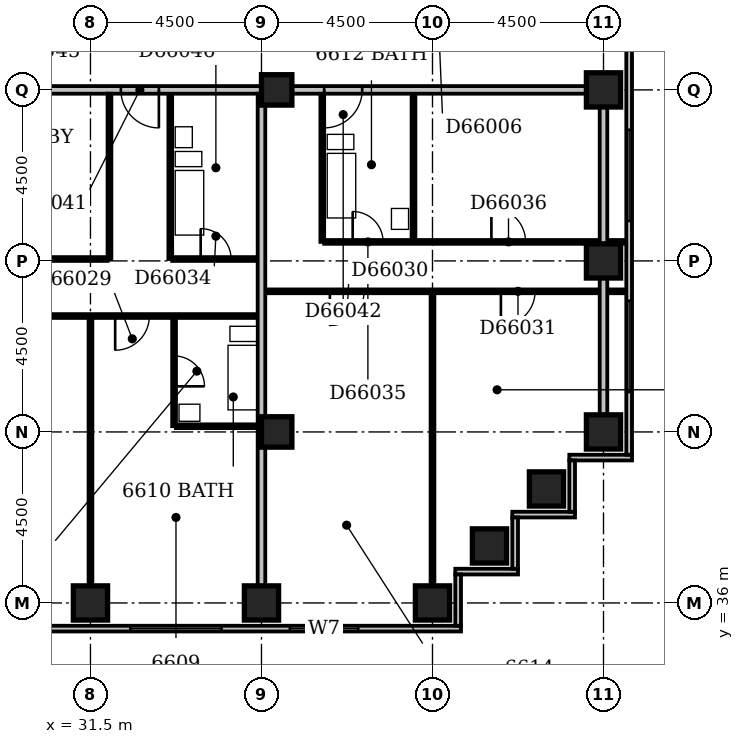
"""IFC4 building model, lengths in metres.
Left out: names, types, materials, properties, quantities, classifications, styles, units other than length and angle.
Written with IfcOpenShell. Run it as: python <this file> out.ifc"""

import sys

from ifc_helpers import new_model, si_unit, direction, frame, frame_2d, origin, origin_2d, place, context, subcontext, project, spatial, rectangle, extrude, element, fill, save


model = new_model("IFC4")
c1 = context("Model", 3, precision=1e-05, world=origin(), true_north=direction((0.0, 1.0)))
c2 = subcontext(c1, "Body", "Model", "MODEL_VIEW")
j1 = project(units=[si_unit("LENGTHUNIT", "METRE"), si_unit("PLANEANGLEUNIT", "RADIAN")], contexts=[c1])
p1 = place(None, origin())
s1 = spatial("IfcSite", under=j1, at=p1, CompositionType="ELEMENT")
p2 = place(p1, origin())
s2 = spatial("IfcBuilding", under=s1, at=p2, CompositionType="ELEMENT")
p3 = place(p2, frame((0.0, 0.0, 254.6)))
s3 = spatial("IfcBuildingStorey", under=s2, at=p3, CompositionType="ELEMENT", Elevation=254.6)
for number, where, z_axis, x_axis in (
    (1, (31.5, 36.0, -0.3), (0.0, 0.0, 1.0), (1.0, 0.0, 0.0)),
    (2, (36.0, 36.0, -0.3), (0.0, 0.0, 1.0), (1.0, 0.0, 0.0)),
    (3, (40.5, 36.0, -0.3), (0.0, 0.0, 1.0), (1.0, 0.0, 0.0)),
    (4, (42.0, 37.5, -0.3), (0.0, 0.0, 1.0), (1.0, 0.0, 0.0)),
    (5, (43.5, 39.0, -0.3), (0.0, 0.0, 1.0), (1.0, 0.0, 0.0)),
    (6, (45.0, 40.5, -0.3), (0.0, 0.0, 1.0), (1.0, 0.0, 0.0)),
    (7, (45.0, 45.0, -0.3), (0.0, 0.0, 1.0), (1.0, 0.0, 0.0)),
    (8, (45.0, 49.5, -0.3), (0.0, 0.0, 1.0), (1.0, 0.0, 0.0)),
):
    element("IfcColumn", number, at=place(p3, frame(where, z_axis=z_axis, x_axis=x_axis)), inside=s3, PredefinedType="COLUMN", context=c2, shape_type="SweptSolid", body=[
        extrude(rectangle(XDim=0.9, YDim=0.9, at=origin_2d()), origin(), (0.0, 0.0, 1.0), 3.45),
    ])
for number, where, z_axis, x_axis in (
    (9, (36.4, 40.5, -0.3), (0.0, 0.0, 1.0), (1.0, 0.0, 0.0)),
    (10, (36.4, 49.5, -0.3), (0.0, 0.0, 1.0), (1.0, 0.0, 0.0)),
):
    element("IfcColumn", number, at=place(p3, frame(where, z_axis=z_axis, x_axis=x_axis)), inside=s3, PredefinedType="COLUMN", context=c2, shape_type="SweptSolid", body=[
        extrude(rectangle(XDim=0.8, YDim=0.8, at=origin_2d()), origin(), (0.0, 0.0, 1.0), 3.45),
    ])
p4 = place(p3, frame((23.1, 35.325, 0.0), z_axis=(0.0, 0.0, 1.0), x_axis=(1.0, 0.0, 0.0)))
e11 = element("IfcWall", 11, at=p4, inside=s3, PredefinedType="STANDARD", context=c2, shape_type="SweptSolid", body=[
    extrude(rectangle(XDim=18.15, YDim=0.15, at=frame_2d((9.075, 0.0))), origin(), (0.0, 0.0, 1.0), 2.7),
])
p5 = place(p4, frame((0.45, 0.0, 0.6)))
e12 = element("IfcOpeningElement", 12, at=p5, cuts=e11, PredefinedType="OPENING", context=c2, shape_type="SweptSolid", body=[
    extrude(rectangle(XDim=2.4, YDim=1.8, at=frame_2d((1.2, 0.9))), frame((0.0, 0.087, 0.0), z_axis=(0.0, -1.0, 0.0), x_axis=(1.0, 0.0, 0.0)), (0.0, 0.0, 1.0), 0.174),
])
p6 = place(p4, frame((4.95, 0.0, 0.6)))
e13 = element("IfcOpeningElement", 13, at=p6, cuts=e11, PredefinedType="OPENING", context=c2, shape_type="SweptSolid", body=[
    extrude(rectangle(XDim=2.4, YDim=1.8, at=frame_2d((1.2, 0.9))), frame((0.0, 0.087, 0.0), z_axis=(0.0, -1.0, 0.0), x_axis=(1.0, 0.0, 0.0)), (0.0, 0.0, 1.0), 0.174),
])
p7 = place(p4, frame((9.45, 0.0, 0.6)))
e14 = element("IfcOpeningElement", 14, at=p7, cuts=e11, PredefinedType="OPENING", context=c2, shape_type="SweptSolid", body=[
    extrude(rectangle(XDim=2.4, YDim=1.8, at=frame_2d((1.2, 0.9))), frame((0.0, 0.087, 0.0), z_axis=(0.0, -1.0, 0.0), x_axis=(1.0, 0.0, 0.0)), (0.0, 0.0, 1.0), 0.174),
])
p8 = place(p4, frame((13.646, 0.0, 0.6)))
e15 = element("IfcOpeningElement", 15, at=p8, cuts=e11, PredefinedType="OPENING", context=c2, shape_type="SweptSolid", body=[
    extrude(rectangle(XDim=1.8, YDim=1.8, at=frame_2d((0.9, 0.9))), frame((0.0, 0.087, 0.0), z_axis=(0.0, -1.0, 0.0), x_axis=(1.0, 0.0, 0.0)), (0.0, 0.0, 1.0), 0.174),
])
p9 = place(p3, frame((41.175, 35.4, 0.0), z_axis=(0.0, 0.0, 1.0), x_axis=(0.0, 1.0, 0.0)))
e16 = element("IfcWall", 16, at=p9, inside=s3, PredefinedType="STANDARD", context=c2, shape_type="SweptSolid", body=[
    extrude(rectangle(XDim=1.35, YDim=0.15, at=frame_2d((0.675, 0.0))), origin(), (0.0, 0.0, 1.0), 2.7),
])
p10 = place(p3, frame((41.1, 36.825, 0.0), z_axis=(0.0, 0.0, 1.0), x_axis=(1.0, 0.0, 0.0)))
e17 = element("IfcWall", 17, at=p10, inside=s3, PredefinedType="STANDARD", context=c2, shape_type="SweptSolid", body=[
    extrude(rectangle(XDim=1.65, YDim=0.15, at=frame_2d((0.825, 0.0))), origin(), (0.0, 0.0, 1.0), 2.7),
])
p11 = place(p3, frame((42.675, 36.9, 0.0), z_axis=(0.0, 0.0, 1.0), x_axis=(0.0, 1.0, 0.0)))
e18 = element("IfcWall", 18, at=p11, inside=s3, PredefinedType="STANDARD", context=c2, shape_type="SweptSolid", body=[
    extrude(rectangle(XDim=1.35, YDim=0.15, at=frame_2d((0.675, 0.0))), origin(), (0.0, 0.0, 1.0), 2.7),
])
p12 = place(p3, frame((42.6, 38.325, 0.0), z_axis=(0.0, 0.0, 1.0), x_axis=(1.0, 0.0, 0.0)))
e19 = element("IfcWall", 19, at=p12, inside=s3, PredefinedType="STANDARD", context=c2, shape_type="SweptSolid", body=[
    extrude(rectangle(XDim=1.65, YDim=0.15, at=frame_2d((0.825, 0.0))), origin(), (0.0, 0.0, 1.0), 2.7),
])
p13 = place(p3, frame((44.175, 38.4, 0.0), z_axis=(0.0, 0.0, 1.0), x_axis=(0.0, 1.0, 0.0)))
e20 = element("IfcWall", 20, at=p13, inside=s3, PredefinedType="STANDARD", context=c2, shape_type="SweptSolid", body=[
    extrude(rectangle(XDim=1.35, YDim=0.15, at=frame_2d((0.675, 0.0))), origin(), (0.0, 0.0, 1.0), 2.7),
])
p14 = place(p3, frame((44.1, 39.825, 0.0), z_axis=(0.0, 0.0, 1.0), x_axis=(1.0, 0.0, 0.0)))
e21 = element("IfcWall", 21, at=p14, inside=s3, PredefinedType="STANDARD", context=c2, shape_type="SweptSolid", body=[
    extrude(rectangle(XDim=1.65, YDim=0.15, at=frame_2d((0.825, 0.0))), origin(), (0.0, 0.0, 1.0), 2.7),
])
p15 = place(p3, frame((45.675, 39.9, 0.0), z_axis=(0.0, 0.0, 1.0), x_axis=(0.0, 1.0, 0.0)))
e22 = element("IfcWall", 22, at=p15, inside=s3, PredefinedType="STANDARD", context=c2, shape_type="SweptSolid", body=[
    extrude(rectangle(XDim=19.35, YDim=0.15, at=frame_2d((9.675, 0.0))), origin(), (0.0, 0.0, 1.0), 2.7),
])
p16 = place(p15, frame((1.65, 0.0, 0.6)))
e23 = element("IfcOpeningElement", 23, at=p16, cuts=e22, PredefinedType="OPENING", context=c2, shape_type="SweptSolid", body=[
    extrude(rectangle(XDim=2.4, YDim=1.8, at=frame_2d((1.2, 0.9))), frame((0.0, 0.087, 0.0), z_axis=(0.0, -1.0, 0.0), x_axis=(1.0, 0.0, 0.0)), (0.0, 0.0, 1.0), 0.174),
])
p17 = place(p15, frame((6.15, 0.0, 0.6)))
e24 = element("IfcOpeningElement", 24, at=p17, cuts=e22, PredefinedType="OPENING", context=c2, shape_type="SweptSolid", body=[
    extrude(rectangle(XDim=2.4, YDim=1.8, at=frame_2d((1.2, 0.9))), frame((0.0, 0.087, 0.0), z_axis=(0.0, -1.0, 0.0), x_axis=(1.0, 0.0, 0.0)), (0.0, 0.0, 1.0), 0.174),
])
p18 = place(p3, frame((31.5, 36.45, 0.0), z_axis=(0.0, 0.0, 1.0), x_axis=(0.0, 1.0, 0.0)))
e25 = element("IfcWall", 25, at=p18, inside=s3, PredefinedType="PARTITIONING", context=c2, shape_type="SweptSolid", body=[
    extrude(rectangle(XDim=7.05, YDim=0.1, at=frame_2d((3.525, 0.0))), origin(), (0.0, 0.0, 1.0), 3.15),
])
p19 = place(p3, frame((36.0, 36.45, 0.0), z_axis=(0.0, 0.0, 1.0), x_axis=(0.0, 1.0, 0.0)))
e26 = element("IfcWall", 26, at=p19, inside=s3, PredefinedType="PARTITIONING", context=c2, shape_type="SweptSolid", body=[
    extrude(rectangle(XDim=12.95, YDim=0.2, at=frame_2d((6.475, 0.0))), origin(), (0.0, 0.0, 1.0), 3.15),
])
p20 = place(p3, frame((40.5, 36.45, 0.0), z_axis=(0.0, 0.0, 1.0), x_axis=(0.0, 1.0, 0.0)))
e27 = element("IfcWall", 27, at=p20, inside=s3, PredefinedType="PARTITIONING", context=c2, shape_type="SweptSolid", body=[
    extrude(rectangle(XDim=7.7, YDim=0.1, at=frame_2d((3.85, 0.0))), origin(), (0.0, 0.0, 1.0), 3.15),
])
p21 = place(p3, frame((33.7, 40.65, 0.0), z_axis=(0.0, 0.0, 1.0), x_axis=(0.0, 1.0, 0.0)))
e28 = element("IfcWall", 28, at=p21, inside=s3, PredefinedType="PLUMBINGWALL", context=c2, shape_type="SweptSolid", body=[
    extrude(rectangle(XDim=2.85, YDim=0.1, at=frame_2d((1.425, 0.0))), origin(), (0.0, 0.0, 1.0), 3.15),
])
p22 = place(p21, frame((1.05, 0.0, 0.0)))
e29 = element("IfcOpeningElement", 29, at=p22, cuts=e28, PredefinedType="OPENING", context=c2, shape_type="SweptSolid", body=[
    extrude(rectangle(XDim=0.8, YDim=2.1, at=frame_2d((0.4, 1.05))), frame((0.0, 0.062, 0.0), z_axis=(0.0, -1.0, 0.0), x_axis=(1.0, 0.0, 0.0)), (0.0, 0.0, 1.0), 0.124),
])
p23 = place(p3, frame((33.75, 40.65, 0.0), z_axis=(0.0, 0.0, 1.0), x_axis=(1.0, 0.0, 0.0)))
e30 = element("IfcWall", 30, at=p23, inside=s3, PredefinedType="PLUMBINGWALL", context=c2, shape_type="SweptSolid", body=[
    extrude(rectangle(XDim=2.15, YDim=0.1, at=frame_2d((1.075, 0.0))), origin(), (0.0, 0.0, 1.0), 3.15),
])
p24 = place(p3, frame((45.0, 40.95, 0.0), z_axis=(0.0, 0.0, 1.0), x_axis=(0.0, 1.0, 0.0)))
e31 = element("IfcWall", 31, at=p24, inside=s3, PredefinedType="PARTITIONING", context=c2, shape_type="SweptSolid", body=[
    extrude(rectangle(XDim=8.1, YDim=0.2, at=frame_2d((4.05, 0.0))), origin(), (0.0, 0.0, 1.0), 2.7),
])
p25 = place(p3, frame((27.1, 43.55, 0.0), z_axis=(0.0, 0.0, 1.0), x_axis=(1.0, 0.0, 0.0)))
e32 = element("IfcWall", 32, at=p25, inside=s3, PredefinedType="PARTITIONING", context=c2, shape_type="SweptSolid", body=[
    extrude(rectangle(XDim=8.8, YDim=0.1, at=frame_2d((4.4, 0.0))), origin(), (0.0, 0.0, 1.0), 3.15),
])
p26 = place(p25, frame((1.7, 0.0, 0.0)))
e33 = element("IfcOpeningElement", 33, at=p26, cuts=e32, PredefinedType="OPENING", context=c2, shape_type="SweptSolid", body=[
    extrude(rectangle(XDim=0.9, YDim=2.1, at=frame_2d((0.45, 1.05))), frame((0.0, 0.062, 0.0), z_axis=(0.0, -1.0, 0.0), x_axis=(1.0, 0.0, 0.0)), (0.0, 0.0, 1.0), 0.124),
])
p27 = place(p25, frame((5.05, 0.0, 0.0)))
e34 = element("IfcOpeningElement", 34, at=p27, cuts=e32, PredefinedType="OPENING", context=c2, shape_type="SweptSolid", body=[
    extrude(rectangle(XDim=0.9, YDim=2.1, at=frame_2d((0.45, 1.05))), frame((0.0, 0.062, 0.0), z_axis=(0.0, -1.0, 0.0), x_axis=(1.0, 0.0, 0.0)), (0.0, 0.0, 1.0), 0.124),
])
p28 = place(p3, frame((36.1, 44.2, 0.0), z_axis=(0.0, 0.0, 1.0), x_axis=(1.0, 0.0, 0.0)))
e35 = element("IfcWall", 35, at=p28, inside=s3, PredefinedType="PARTITIONING", context=c2, shape_type="SweptSolid", body=[
    extrude(rectangle(XDim=9.5, YDim=0.1, at=frame_2d((4.75, 0.0))), origin(), (0.0, 0.0, 1.0), 3.15),
])
p29 = place(p28, frame((1.7, 0.0, 0.0)))
e36 = element("IfcOpeningElement", 36, at=p29, cuts=e35, PredefinedType="OPENING", context=c2, shape_type="SweptSolid", body=[
    extrude(rectangle(XDim=0.9, YDim=2.1, at=frame_2d((0.45, 1.05))), frame((0.0, 0.062, 0.0), z_axis=(0.0, -1.0, 0.0), x_axis=(1.0, 0.0, 0.0)), (0.0, 0.0, 1.0), 0.124),
])
p30 = place(p28, frame((6.2, 0.0, 0.0)))
e37 = element("IfcOpeningElement", 37, at=p30, cuts=e35, PredefinedType="OPENING", context=c2, shape_type="SweptSolid", body=[
    extrude(rectangle(XDim=0.9, YDim=2.1, at=frame_2d((0.45, 1.05))), frame((0.0, 0.062, 0.0), z_axis=(0.0, -1.0, 0.0), x_axis=(1.0, 0.0, 0.0)), (0.0, 0.0, 1.0), 0.124),
])
p31 = place(p3, frame((27.1, 45.05, 0.0), z_axis=(0.0, 0.0, 1.0), x_axis=(1.0, 0.0, 0.0)))
e38 = element("IfcWall", 38, at=p31, inside=s3, PredefinedType="PARTITIONING", context=c2, shape_type="SweptSolid", body=[
    extrude(rectangle(XDim=4.85, YDim=0.1, at=frame_2d((2.425, 0.0))), origin(), (0.0, 0.0, 1.0), 3.15),
])
p32 = place(p31, frame((1.95, 0.0, 0.0)))
e39 = element("IfcOpeningElement", 39, at=p32, cuts=e38, PredefinedType="OPENING", context=c2, shape_type="SweptSolid", body=[
    extrude(rectangle(XDim=0.9, YDim=2.1, at=frame_2d((0.45, 1.05))), frame((0.0, 0.062, 0.0), z_axis=(0.0, -1.0, 0.0), x_axis=(1.0, 0.0, 0.0)), (0.0, 0.0, 1.0), 0.124),
])
p33 = place(p3, frame((32.0, 45.05, 0.0), z_axis=(0.0, 0.0, 1.0), x_axis=(0.0, 1.0, 0.0)))
e40 = element("IfcWall", 40, at=p33, inside=s3, PredefinedType="PARTITIONING", context=c2, shape_type="SweptSolid", body=[
    extrude(rectangle(XDim=4.35, YDim=0.1, at=frame_2d((2.175, 0.0))), origin(), (0.0, 0.0, 1.0), 3.15),
])
p34 = place(p3, frame((33.6, 45.05, 0.0), z_axis=(0.0, 0.0, 1.0), x_axis=(0.0, 1.0, 0.0)))
e41 = element("IfcWall", 41, at=p34, inside=s3, PredefinedType="PLUMBINGWALL", context=c2, shape_type="SweptSolid", body=[
    extrude(rectangle(XDim=4.35, YDim=0.1, at=frame_2d((2.175, 0.0))), origin(), (0.0, 0.0, 1.0), 3.15),
])
p35 = place(p3, frame((33.65, 45.05, 0.0), z_axis=(0.0, 0.0, 1.0), x_axis=(1.0, 0.0, 0.0)))
e42 = element("IfcWall", 42, at=p35, inside=s3, PredefinedType="PARTITIONING", context=c2, shape_type="SweptSolid", body=[
    extrude(rectangle(XDim=2.25, YDim=0.1, at=frame_2d((1.125, 0.0))), origin(), (0.0, 0.0, 1.0), 3.15),
])
p36 = place(p35, frame((0.75, 0.0, 0.0)))
e43 = element("IfcOpeningElement", 43, at=p36, cuts=e42, PredefinedType="OPENING", context=c2, shape_type="SweptSolid", body=[
    extrude(rectangle(XDim=0.8, YDim=2.1, at=frame_2d((0.4, 1.05))), frame((0.0, 0.062, 0.0), z_axis=(0.0, -1.0, 0.0), x_axis=(1.0, 0.0, 0.0)), (0.0, 0.0, 1.0), 0.124),
])
p37 = place(p3, frame((37.6, 45.5, 0.0), z_axis=(0.0, 0.0, 1.0), x_axis=(0.0, 1.0, 0.0)))
e44 = element("IfcWall", 44, at=p37, inside=s3, PredefinedType="PLUMBINGWALL", context=c2, shape_type="SweptSolid", body=[
    extrude(rectangle(XDim=3.9, YDim=0.1, at=frame_2d((1.95, 0.0))), origin(), (0.0, 0.0, 1.0), 3.15),
])
p38 = place(p3, frame((37.65, 45.5, 0.0), z_axis=(0.0, 0.0, 1.0), x_axis=(1.0, 0.0, 0.0)))
e45 = element("IfcWall", 45, at=p38, inside=s3, PredefinedType="PARTITIONING", context=c2, shape_type="SweptSolid", body=[
    extrude(rectangle(XDim=7.95, YDim=0.1, at=frame_2d((3.975, 0.0))), origin(), (0.0, 0.0, 1.0), 3.15),
])
p39 = place(p38, frame((0.75, 0.0, 0.0)))
e46 = element("IfcOpeningElement", 46, at=p39, cuts=e45, PredefinedType="OPENING", context=c2, shape_type="SweptSolid", body=[
    extrude(rectangle(XDim=0.8, YDim=2.1, at=frame_2d((0.4, 1.05))), frame((0.0, 0.062, 0.0), z_axis=(0.0, -1.0, 0.0), x_axis=(1.0, 0.0, 0.0)), (0.0, 0.0, 1.0), 0.124),
])
p40 = place(p38, frame((4.4, 0.0, 0.0)))
e47 = element("IfcOpeningElement", 47, at=p40, cuts=e45, PredefinedType="OPENING", context=c2, shape_type="SweptSolid", body=[
    extrude(rectangle(XDim=0.9, YDim=2.1, at=frame_2d((0.45, 1.05))), frame((0.0, 0.062, 0.0), z_axis=(0.0, -1.0, 0.0), x_axis=(1.0, 0.0, 0.0)), (0.0, 0.0, 1.0), 0.124),
])
p41 = place(p3, frame((40.0, 45.55, 0.0), z_axis=(0.0, 0.0, 1.0), x_axis=(0.0, 1.0, 0.0)))
e48 = element("IfcWall", 48, at=p41, inside=s3, PredefinedType="PLUMBINGWALL", context=c2, shape_type="SweptSolid", body=[
    extrude(rectangle(XDim=3.85, YDim=0.1, at=frame_2d((1.925, 0.0))), origin(), (0.0, 0.0, 1.0), 3.15),
])
p42 = place(p3, frame((22.6, 49.5, 0.0), z_axis=(0.0, 0.0, 1.0), x_axis=(1.0, 0.0, 0.0)))
e49 = element("IfcWall", 49, at=p42, inside=s3, PredefinedType="PARTITIONING", context=c2, shape_type="SweptSolid", body=[
    extrude(rectangle(XDim=21.95, YDim=0.2, at=frame_2d((10.975, 0.0))), origin(), (0.0, 0.0, 1.0), 3.15),
])
p43 = place(p42, frame((1.85, 0.0, 0.0)))
e50 = element("IfcOpeningElement", 50, at=p43, cuts=e49, PredefinedType="OPENING", context=c2, shape_type="SweptSolid", body=[
    extrude(rectangle(XDim=1.0, YDim=2.1, at=frame_2d((0.5, 1.05))), frame((0.0, 0.112, 0.0), z_axis=(0.0, -1.0, 0.0), x_axis=(1.0, 0.0, 0.0)), (0.0, 0.0, 1.0), 0.224),
])
p44 = place(p42, frame((9.7, 0.0, 0.0)))
e51 = element("IfcOpeningElement", 51, at=p44, cuts=e49, PredefinedType="OPENING", context=c2, shape_type="SweptSolid", body=[
    extrude(rectangle(XDim=1.0, YDim=2.1, at=frame_2d((0.5, 1.05))), frame((0.0, 0.112, 0.0), z_axis=(0.0, -1.0, 0.0), x_axis=(1.0, 0.0, 0.0)), (0.0, 0.0, 1.0), 0.224),
])
p45 = place(p42, frame((15.05, 0.0, 0.0)))
e52 = element("IfcOpeningElement", 52, at=p45, cuts=e49, PredefinedType="OPENING", context=c2, shape_type="SweptSolid", body=[
    extrude(rectangle(XDim=1.0, YDim=2.1, at=frame_2d((0.5, 1.05))), frame((0.0, 0.112, 0.0), z_axis=(0.0, -1.0, 0.0), x_axis=(1.0, 0.0, 0.0)), (0.0, 0.0, 1.0), 0.224),
])
p46 = place(p7, origin())
e53 = element("IfcWindow", 53, at=p46, inside=s3, PartitioningType="SINGLE_PANEL", PredefinedType="WINDOW", context=c2, shape_type="SweptSolid", body=[
    extrude(rectangle(XDim=2.4, YDim=1.8, at=frame_2d((1.2, 0.9))), frame((0.0, 0.03, 0.0), z_axis=(0.0, -1.0, 0.0), x_axis=(1.0, 0.0, 0.0)), (0.0, 0.0, 1.0), 0.06),
])
fill(e14, e53)
p47 = place(p8, origin())
e54 = element("IfcWindow", 54, at=p47, inside=s3, PartitioningType="SINGLE_PANEL", PredefinedType="WINDOW", context=c2, shape_type="SweptSolid", body=[
    extrude(rectangle(XDim=1.8, YDim=1.8, at=frame_2d((0.9, 0.9))), frame((0.0, 0.03, 0.0), z_axis=(0.0, -1.0, 0.0), x_axis=(1.0, 0.0, 0.0)), (0.0, 0.0, 1.0), 0.06),
])
fill(e15, e54)
p48 = place(p16, origin())
e55 = element("IfcWindow", 55, at=p48, inside=s3, PartitioningType="SINGLE_PANEL", PredefinedType="WINDOW", context=c2, shape_type="SweptSolid", body=[
    extrude(rectangle(XDim=2.4, YDim=1.8, at=frame_2d((1.2, 0.9))), frame((0.0, 0.03, 0.0), z_axis=(0.0, -1.0, 0.0), x_axis=(1.0, 0.0, 0.0)), (0.0, 0.0, 1.0), 0.06),
])
fill(e23, e55)
p49 = place(p17, origin())
e56 = element("IfcWindow", 56, at=p49, inside=s3, PartitioningType="SINGLE_PANEL", PredefinedType="WINDOW", context=c2, shape_type="SweptSolid", body=[
    extrude(rectangle(XDim=2.4, YDim=1.8, at=frame_2d((1.2, 0.9))), frame((0.0, 0.03, 0.0), z_axis=(0.0, -1.0, 0.0), x_axis=(1.0, 0.0, 0.0)), (0.0, 0.0, 1.0), 0.06),
])
fill(e24, e56)
p50 = place(p22, frame((0.8, 0.0, 0.0), z_axis=(0.0, 0.0, 1.0), x_axis=(-1.0, 0.0, 0.0)))
e57 = element("IfcDoor", 57, at=p50, inside=s3, OperationType="SINGLE_SWING_RIGHT", PredefinedType="DOOR", context=c2, shape_type="SweptSolid", body=[
    extrude(rectangle(XDim=0.8, YDim=2.1, at=frame_2d((0.4, 1.05))), frame((0.0, 0.025, 0.0), z_axis=(0.0, -1.0, 0.0), x_axis=(1.0, 0.0, 0.0)), (0.0, 0.0, 1.0), 0.05),
])
fill(e29, e57)
p51 = place(p27, frame((0.9, 0.0, 0.0), z_axis=(0.0, 0.0, 1.0), x_axis=(-1.0, 0.0, 0.0)))
e58 = element("IfcDoor", 58, at=p51, inside=s3, OperationType="SINGLE_SWING_RIGHT", PredefinedType="DOOR", context=c2, shape_type="SweptSolid", body=[
    extrude(rectangle(XDim=0.9, YDim=2.1, at=frame_2d((0.45, 1.05))), frame((0.0, 0.025, 0.0), z_axis=(0.0, -1.0, 0.0), x_axis=(1.0, 0.0, 0.0)), (0.0, 0.0, 1.0), 0.05),
])
fill(e34, e58)
p52 = place(p29, frame((0.9, 0.0, 0.0), z_axis=(0.0, 0.0, 1.0), x_axis=(-1.0, 0.0, 0.0)))
e59 = element("IfcDoor", 59, at=p52, inside=s3, OperationType="SINGLE_SWING_RIGHT", PredefinedType="DOOR", context=c2, shape_type="SweptSolid", body=[
    extrude(rectangle(XDim=0.9, YDim=2.1, at=frame_2d((0.45, 1.05))), frame((0.0, 0.025, 0.0), z_axis=(0.0, -1.0, 0.0), x_axis=(1.0, 0.0, 0.0)), (0.0, 0.0, 1.0), 0.05),
])
fill(e36, e59)
p53 = place(p30, frame((0.9, 0.0, 0.0), z_axis=(0.0, 0.0, 1.0), x_axis=(-1.0, 0.0, 0.0)))
e60 = element("IfcDoor", 60, at=p53, inside=s3, OperationType="SINGLE_SWING_RIGHT", PredefinedType="DOOR", context=c2, shape_type="SweptSolid", body=[
    extrude(rectangle(XDim=0.9, YDim=2.1, at=frame_2d((0.45, 1.05))), frame((0.0, 0.025, 0.0), z_axis=(0.0, -1.0, 0.0), x_axis=(1.0, 0.0, 0.0)), (0.0, 0.0, 1.0), 0.05),
])
fill(e37, e60)
p54 = place(p36, origin())
e61 = element("IfcDoor", 61, at=p54, inside=s3, OperationType="SINGLE_SWING_LEFT", PredefinedType="DOOR", context=c2, shape_type="SweptSolid", body=[
    extrude(rectangle(XDim=0.8, YDim=2.1, at=frame_2d((0.4, 1.05))), frame((0.0, 0.025, 0.0), z_axis=(0.0, -1.0, 0.0), x_axis=(1.0, 0.0, 0.0)), (0.0, 0.0, 1.0), 0.05),
])
fill(e43, e61)
p55 = place(p39, origin())
e62 = element("IfcDoor", 62, at=p55, inside=s3, OperationType="SINGLE_SWING_LEFT", PredefinedType="DOOR", context=c2, shape_type="SweptSolid", body=[
    extrude(rectangle(XDim=0.8, YDim=2.1, at=frame_2d((0.4, 1.05))), frame((0.0, 0.025, 0.0), z_axis=(0.0, -1.0, 0.0), x_axis=(1.0, 0.0, 0.0)), (0.0, 0.0, 1.0), 0.05),
])
fill(e46, e62)
p56 = place(p40, origin())
e63 = element("IfcDoor", 63, at=p56, inside=s3, OperationType="SINGLE_SWING_LEFT", PredefinedType="DOOR", context=c2, shape_type="SweptSolid", body=[
    extrude(rectangle(XDim=0.9, YDim=2.1, at=frame_2d((0.45, 1.05))), frame((0.0, 0.025, 0.0), z_axis=(0.0, -1.0, 0.0), x_axis=(1.0, 0.0, 0.0)), (0.0, 0.0, 1.0), 0.05),
])
fill(e47, e63)
p57 = place(p44, origin())
e64 = element("IfcDoor", 64, at=p57, inside=s3, OperationType="SINGLE_SWING_RIGHT", PredefinedType="DOOR", context=c2, shape_type="SweptSolid", body=[
    extrude(rectangle(XDim=1.0, YDim=2.1, at=frame_2d((0.5, 1.05))), frame((0.0, 0.025, 0.0), z_axis=(0.0, -1.0, 0.0), x_axis=(1.0, 0.0, 0.0)), (0.0, 0.0, 1.0), 0.05),
])
fill(e51, e64)
p58 = place(p45, frame((1.0, 0.0, 0.0), z_axis=(0.0, 0.0, 1.0), x_axis=(-1.0, 0.0, 0.0)))
e65 = element("IfcDoor", 65, at=p58, inside=s3, OperationType="SINGLE_SWING_RIGHT", PredefinedType="DOOR", context=c2, shape_type="SweptSolid", body=[
    extrude(rectangle(XDim=1.0, YDim=2.1, at=frame_2d((0.5, 1.05))), frame((0.0, 0.025, 0.0), z_axis=(0.0, -1.0, 0.0), x_axis=(1.0, 0.0, 0.0)), (0.0, 0.0, 1.0), 0.05),
])
fill(e52, e65)
save(model, sys.argv[1])
